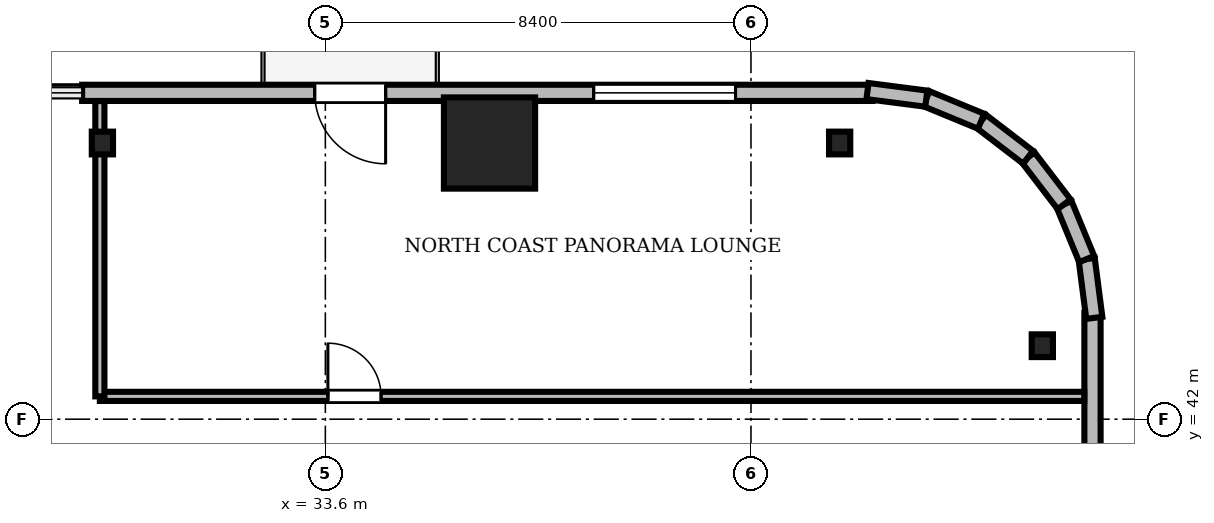
"""IFC4 building model, lengths in metres.
Left out: names, types, materials, properties, quantities, classifications, styles, units other than length and angle.
Written with IfcOpenShell. Run it as: python <this file> out.ifc"""

import sys

from ifc_helpers import new_model, si_unit, direction, frame, frame_2d, origin, origin_2d, place, context, subcontext, project, spatial, rectangle, i_section, extrude, source, transform, mapped, element, fill, save


model = new_model("IFC4")
c1 = context("Model", 3, precision=1e-05, world=origin(), true_north=direction((0.0, 1.0)))
c2 = subcontext(c1, "Body", "Model", "MODEL_VIEW")
j1 = project(units=[si_unit("LENGTHUNIT", "METRE"), si_unit("PLANEANGLEUNIT", "RADIAN")], contexts=[c1])
p1 = place(None, origin())
s1 = spatial("IfcSite", under=j1, at=p1, CompositionType="ELEMENT")
p2 = place(p1, origin())
s2 = spatial("IfcBuilding", under=s1, at=p2, CompositionType="ELEMENT")
p3 = place(p2, frame((0.0, 0.0, 71.4)))
s3 = spatial("IfcBuildingStorey", under=s2, at=p3, CompositionType="ELEMENT", Elevation=71.4)
m1 = source(origin(), c2, "Body", "SweptSolid", [
    extrude(rectangle(XDim=1.8, YDim=1.8, at=origin_2d()), origin(), (0.0, 0.0, 1.0), 3.41),
])
p4 = place(p3, frame((36.84, 47.45, 0.0), z_axis=(0.0, 0.0, 1.0), x_axis=(1.0, 0.0, 0.0)))
e1 = element("IfcColumn", 1, at=p4, inside=s3, PredefinedType="COLUMN", context=c2, shape_type="MappedRepresentation", body=[
    mapped(m1, transform((0.0, 0.0, 0.0), scale=1.0)),
])
m2 = source(origin(), c2, "Body", "SweptSolid", [
    extrude(i_section(OverallWidth=0.419, OverallDepth=0.449, WebThickness=0.031, FlangeThickness=0.048, FilletRadius=0.015, at=origin_2d()), origin(), (0.0, 0.0, 1.0), 3.41),
])
for number, where, z_axis, x_axis in (
    (2, (47.75, 43.45, 0.0), (0.0, 0.0, 1.0), (1.0, 0.0, 0.0)),
    (3, (43.75, 47.45, 0.0), (0.0, 0.0, 1.0), (1.0, 0.0, 0.0)),
    (4, (29.2, 47.45, 0.0), (0.0, 0.0, 1.0), (1.0, 0.0, 0.0)),
):
    element("IfcColumn", number, at=place(p3, frame(where, z_axis=z_axis, x_axis=x_axis)), inside=s3, PredefinedType="COLUMN", context=c2, shape_type="MappedRepresentation", body=[
        mapped(m2, transform((0.0, 0.0, 0.0), scale=1.0)),
    ])
m3 = source(origin(), c2, "Body", "SweptSolid", [
    extrude(rectangle(XDim=15.6, YDim=0.32, at=frame_2d((7.8, 0.0))), origin(), (0.0, 0.0, 1.0), 3.41),
])
p5 = place(p3, frame((44.4, 48.44, 0.0), z_axis=(0.0, 0.0, 1.0), x_axis=(-1.0, 0.0, 0.0)))
e5 = element("IfcWall", 5, at=p5, inside=s3, PredefinedType="SOLIDWALL", context=c2, shape_type="MappedRepresentation", body=[
    mapped(m3, transform((0.0, 0.0, 0.0), scale=1.0)),
])
m4 = source(origin(), c2, "Body", "SweptSolid", [
    extrude(rectangle(XDim=1.4, YDim=2.3, at=frame_2d((0.7, 1.15))), frame((0.0, 0.17, 0.0), z_axis=(0.0, -1.0, 0.0), x_axis=(1.0, 0.0, 0.0)), (0.0, 0.0, 1.0), 0.34),
])
p6 = place(p5, frame((9.61, 0.0, 0.0)))
e6 = element("IfcOpeningElement", 6, at=p6, cuts=e5, PredefinedType="OPENING", context=c2, shape_type="MappedRepresentation", body=[
    mapped(m4, transform((0.0, 0.0, 0.0), scale=1.0)),
])
m5 = source(origin(), c2, "Body", "SweptSolid", [
    extrude(rectangle(XDim=2.8, YDim=2.4, at=frame_2d((1.4, 1.2))), frame((0.0, 0.17, 0.0), z_axis=(0.0, -1.0, 0.0), x_axis=(1.0, 0.0, 0.0)), (0.0, 0.0, 1.0), 0.34),
])
p7 = place(p5, frame((2.705, 0.0, 0.72)))
e7 = element("IfcOpeningElement", 7, at=p7, cuts=e5, PredefinedType="OPENING", context=c2, shape_type="MappedRepresentation", body=[
    mapped(m5, transform((0.0, 0.0, 0.0), scale=1.0)),
])
m6 = source(origin(), c2, "Body", "SweptSolid", [
    extrude(rectangle(XDim=15.6, YDim=0.32, at=frame_2d((7.8, 0.0))), origin(), (0.0, 0.0, 1.0), 3.41),
])
p8 = place(p3, frame((48.74, 28.5, 0.0), z_axis=(0.0, 0.0, 1.0), x_axis=(0.0, 1.0, 0.0)))
e8 = element("IfcWall", 8, at=p8, inside=s3, PredefinedType="SOLIDWALL", context=c2, shape_type="MappedRepresentation", body=[
    mapped(m6, transform((0.0, 0.0, 0.0), scale=1.0)),
])
p9 = place(p8, frame((10.095, 0.0, 0.72)))
e9 = element("IfcOpeningElement", 9, at=p9, cuts=e8, PredefinedType="OPENING", context=c2, shape_type="MappedRepresentation", body=[
    mapped(m5, transform((0.0, 0.0, 0.0), scale=1.0)),
])
m7 = source(origin(), c2, "Body", "SweptSolid", [
    extrude(rectangle(XDim=1.17, YDim=0.32, at=frame_2d((0.585, 0.0))), origin(), (0.0, 0.0, 1.0), 3.41),
])
p10 = place(p3, frame((48.776, 44.0, 0.0), z_axis=(0.0, 0.0, 1.0), x_axis=(-0.128295670475, 0.991735963317, 0.0)))
e10 = element("IfcWall", 10, at=p10, inside=s3, PredefinedType="SOLIDWALL", context=c2, shape_type="MappedRepresentation", body=[
    mapped(m7, transform((0.0, 0.0, 0.0), scale=1.0)),
])
m8 = source(origin(), c2, "Body", "SweptSolid", [
    extrude(rectangle(XDim=1.169, YDim=0.32, at=frame_2d((0.584, 0.0))), origin(), (0.0, 0.0, 1.0), 3.41),
])
p11 = place(p3, frame((48.625, 45.16, 0.0), z_axis=(0.0, 0.0, 1.0), x_axis=(-0.381054331552, 0.924552646638, 0.0)))
e11 = element("IfcWall", 11, at=p11, inside=s3, PredefinedType="SOLIDWALL", context=c2, shape_type="MappedRepresentation", body=[
    mapped(m8, transform((0.0, 0.0, 0.0), scale=1.0)),
])
m9 = source(origin(), c2, "Body", "SweptSolid", [
    extrude(rectangle(XDim=1.169, YDim=0.32, at=frame_2d((0.584, 0.0))), origin(), (0.0, 0.0, 1.0), 3.41),
])
p12 = place(p3, frame((48.18, 46.241, 0.0), z_axis=(0.0, 0.0, 1.0), x_axis=(-0.608387696831, 0.793639975269, 0.0)))
e12 = element("IfcWall", 12, at=p12, inside=s3, PredefinedType="SOLIDWALL", context=c2, shape_type="MappedRepresentation", body=[
    mapped(m9, transform((0.0, 0.0, 0.0), scale=1.0)),
])
m10 = source(origin(), c2, "Body", "SweptSolid", [
    extrude(rectangle(XDim=1.169, YDim=0.32, at=frame_2d((0.584, 0.0))), origin(), (0.0, 0.0, 1.0), 3.41),
])
p13 = place(p3, frame((47.469, 47.169, 0.0), z_axis=(0.0, 0.0, 1.0), x_axis=(-0.793663520347, 0.608356981114, 0.0)))
e13 = element("IfcWall", 13, at=p13, inside=s3, PredefinedType="SOLIDWALL", context=c2, shape_type="MappedRepresentation", body=[
    mapped(m10, transform((0.0, 0.0, 0.0), scale=1.0)),
])
p14 = place(p3, frame((46.541, 47.88, 0.0), z_axis=(0.0, 0.0, 1.0), x_axis=(-0.924552646638, 0.381054331552, 0.0)))
e14 = element("IfcWall", 14, at=p14, inside=s3, PredefinedType="SOLIDWALL", context=c2, shape_type="MappedRepresentation", body=[
    mapped(m8, transform((0.0, 0.0, 0.0), scale=1.0)),
])
p15 = place(p3, frame((45.46, 48.325, 0.0), z_axis=(0.0, 0.0, 1.0), x_axis=(-0.991735963317, 0.128295670475, 0.0)))
e15 = element("IfcWall", 15, at=p15, inside=s3, PredefinedType="SOLIDWALL", context=c2, shape_type="MappedRepresentation", body=[
    mapped(m7, transform((0.0, 0.0, 0.0), scale=1.0)),
])
m11 = source(origin(), c2, "Body", "SweptSolid", [
    extrude(rectangle(XDim=19.428, YDim=0.18, at=frame_2d((9.714, 0.0))), origin(), (0.0, 0.0, 1.0), 2.652),
])
p16 = place(p3, frame((29.15, 42.45, 0.0), z_axis=(0.0, 0.0, 1.0), x_axis=(1.0, 0.0, 0.0)))
e16 = element("IfcWall", 16, at=p16, inside=s3, PredefinedType="PARTITIONING", context=c2, shape_type="MappedRepresentation", body=[
    mapped(m11, transform((0.0, 0.0, 0.0), scale=1.0)),
])
m12 = source(origin(), c2, "Body", "SweptSolid", [
    extrude(rectangle(XDim=1.05, YDim=2.2, at=frame_2d((0.525, 1.1))), frame((0.0, 0.1, 0.0), z_axis=(0.0, -1.0, 0.0), x_axis=(1.0, 0.0, 0.0)), (0.0, 0.0, 1.0), 0.2),
])
p17 = place(p16, frame((4.5, 0.0, 0.0)))
e17 = element("IfcOpeningElement", 17, at=p17, cuts=e16, PredefinedType="OPENING", context=c2, shape_type="MappedRepresentation", body=[
    mapped(m12, transform((0.0, 0.0, 0.0), scale=1.0)),
])
m13 = source(origin(), c2, "Body", "SweptSolid", [
    extrude(rectangle(XDim=5.828, YDim=0.18, at=frame_2d((2.914, 0.0))), origin(), (0.0, 0.0, 1.0), 2.652),
])
p18 = place(p3, frame((29.15, 42.45, 0.0), z_axis=(0.0, 0.0, 1.0), x_axis=(0.0, 1.0, 0.0)))
e18 = element("IfcWall", 18, at=p18, inside=s3, PredefinedType="PARTITIONING", context=c2, shape_type="MappedRepresentation", body=[
    mapped(m13, transform((0.0, 0.0, 0.0), scale=1.0)),
])
m14 = source(origin(), c2, "Body", "SweptSolid", [
    extrude(rectangle(XDim=1.4, YDim=2.3, at=frame_2d((0.7, 1.15))), frame((0.0, 0.025, 0.0), z_axis=(0.0, -1.0, 0.0), x_axis=(1.0, 0.0, 0.0)), (0.0, 0.0, 1.0), 0.05),
])
p19 = place(p6, frame((1.4, 0.0, 0.0), z_axis=(0.0, 0.0, 1.0), x_axis=(-1.0, 0.0, 0.0)))
e19 = element("IfcDoor", 19, at=p19, inside=s3, OperationType="DOUBLE_DOOR_SLIDING", PredefinedType="DOOR", context=c2, shape_type="MappedRepresentation", body=[
    mapped(m14, transform((0.0, 0.0, 0.0), scale=1.0)),
])
fill(e6, e19)
m15 = source(origin(), c2, "Body", "SweptSolid", [
    extrude(rectangle(XDim=2.8, YDim=2.4, at=frame_2d((1.4, 1.2))), frame((0.0, 0.03, 0.0), z_axis=(0.0, -1.0, 0.0), x_axis=(1.0, 0.0, 0.0)), (0.0, 0.0, 1.0), 0.06),
])
p20 = place(p7, origin())
e20 = element("IfcWindow", 20, at=p20, inside=s3, PartitioningType="SINGLE_PANEL", PredefinedType="WINDOW", context=c2, shape_type="MappedRepresentation", body=[
    mapped(m15, transform((0.0, 0.0, 0.0), scale=1.0)),
])
fill(e7, e20)
m16 = source(origin(), c2, "Body", "SweptSolid", [
    extrude(rectangle(XDim=1.05, YDim=2.2, at=frame_2d((0.525, 1.1))), frame((0.0, 0.025, 0.0), z_axis=(0.0, -1.0, 0.0), x_axis=(1.0, 0.0, 0.0)), (0.0, 0.0, 1.0), 0.05),
])
p21 = place(p17, origin())
e21 = element("IfcDoor", 21, at=p21, inside=s3, OperationType="SINGLE_SWING_LEFT", PredefinedType="DOOR", context=c2, shape_type="MappedRepresentation", body=[
    mapped(m16, transform((0.0, 0.0, 0.0), scale=1.0)),
])
fill(e17, e21)
save(model, sys.argv[1])
